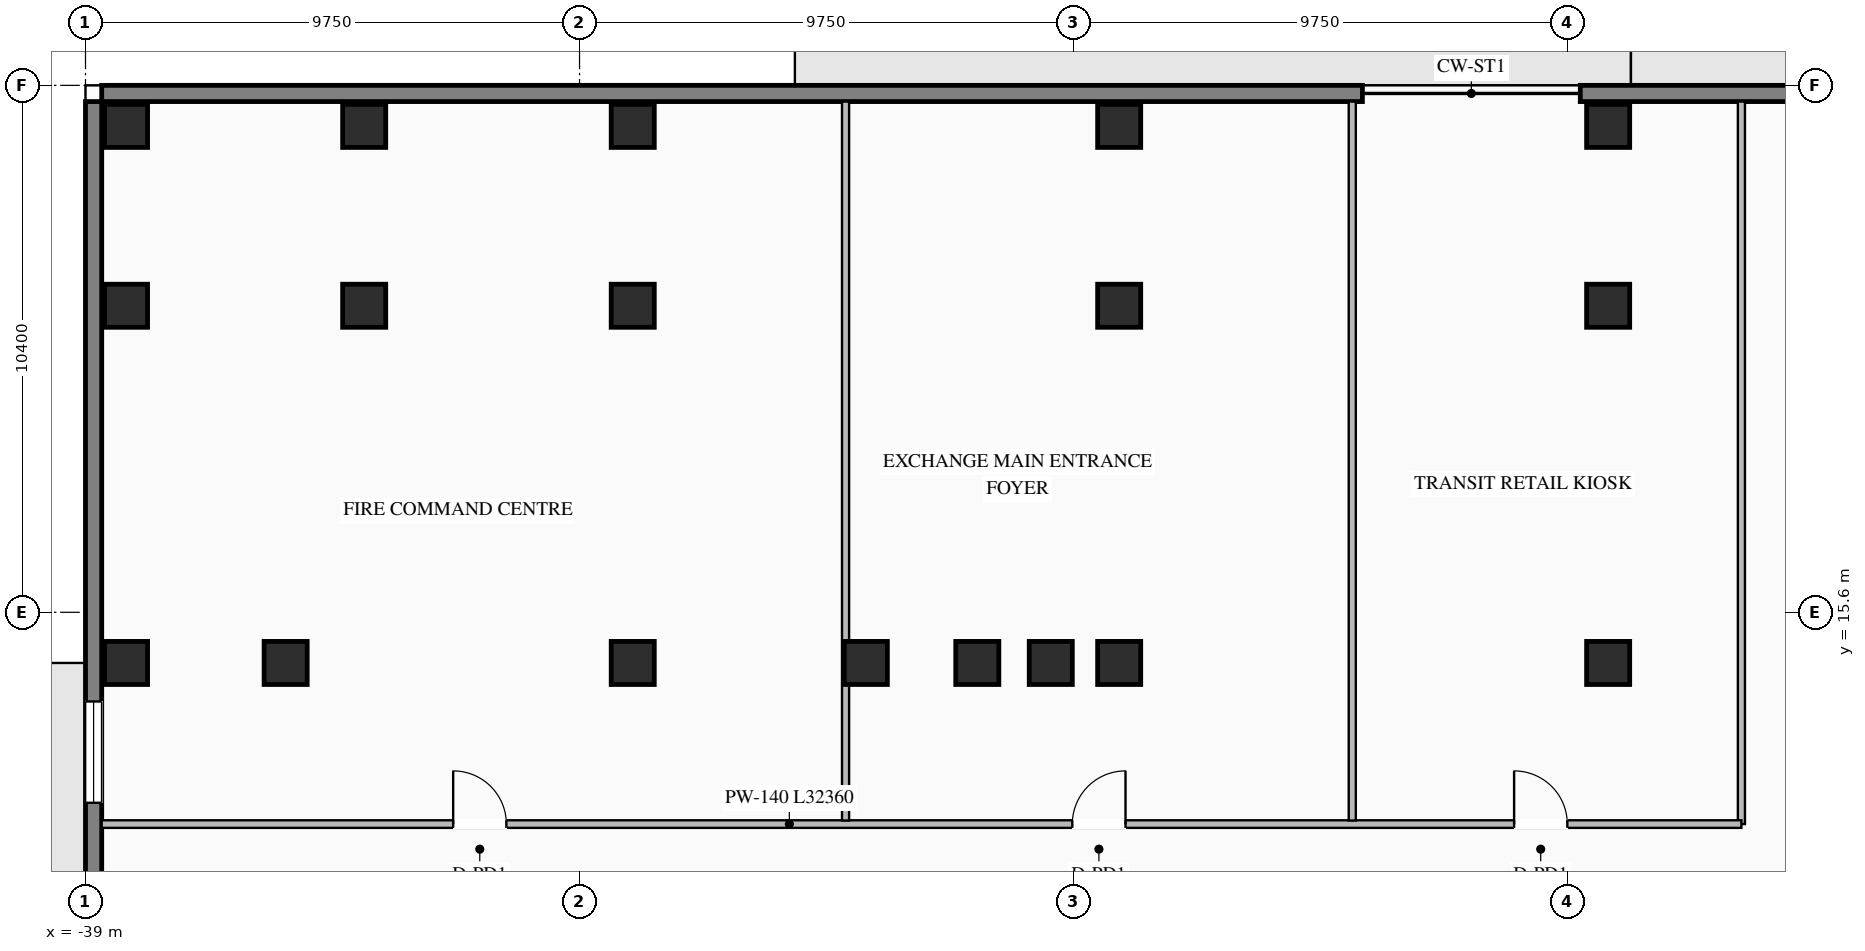
"""IFC4 building model, lengths in metres.
Left out: names, types, materials, properties, quantities, classifications, styles, units other than length and angle.
Written with IfcOpenShell. Run it as: python <this file> out.ifc"""

import sys

from ifc_helpers import new_model, si_unit, direction, frame, frame_2d, origin, origin_2d, place, context, subcontext, project, spatial, rectangle, i_section, extrude, element, fill, save


model = new_model("IFC4")
c1 = context("Model", 3, precision=1e-05, world=origin(), true_north=direction((0.0, 1.0)))
c2 = subcontext(c1, "Body", "Model", "MODEL_VIEW")
j1 = project(units=[si_unit("LENGTHUNIT", "METRE"), si_unit("PLANEANGLEUNIT", "RADIAN")], contexts=[c1])
p1 = place(None, origin())
s1 = spatial("IfcSite", under=j1, at=p1, CompositionType="ELEMENT")
p2 = place(p1, origin())
s2 = spatial("IfcBuilding", under=s1, at=p2, CompositionType="ELEMENT")
p3 = place(p2, origin())
s3 = spatial("IfcBuildingStorey", under=s2, at=p3, CompositionType="ELEMENT", Elevation=0.0)
for number, where, z_axis, x_axis in (
    (1, (-21.4, 14.6, 0.0), (0.0, 0.0, 1.0), (1.0, 0.0, 0.0)),
    (2, (-19.95, 14.6, 0.0), (0.0, 0.0, 1.0), (1.0, 0.0, 0.0)),
    (3, (-18.6, 14.6, 0.0), (0.0, 0.0, 1.0), (1.0, 0.0, 0.0)),
    (4, (-8.95, 14.6, 0.0), (0.0, 0.0, 1.0), (1.0, 0.0, 0.0)),
    (5, (-23.6, 14.6, 0.0), (0.0, 0.0, 1.0), (1.0, 0.0, 0.0)),
    (6, (-28.2, 14.6, 0.0), (0.0, 0.0, 1.0), (1.0, 0.0, 0.0)),
    (7, (-35.05, 14.6, 0.0), (0.0, 0.0, 1.0), (1.0, 0.0, 0.0)),
    (8, (-38.2, 21.65, 0.0), (0.0, 0.0, 1.0), (1.0, 0.0, 0.0)),
    (9, (-33.5, 21.65, 0.0), (0.0, 0.0, 1.0), (1.0, 0.0, 0.0)),
    (10, (-28.2, 21.65, 0.0), (0.0, 0.0, 1.0), (1.0, 0.0, 0.0)),
    (11, (-18.6, 21.65, 0.0), (0.0, 0.0, 1.0), (1.0, 0.0, 0.0)),
    (12, (-8.95, 21.65, 0.0), (0.0, 0.0, 1.0), (1.0, 0.0, 0.0)),
    (13, (-38.2, 25.2, 0.0), (0.0, 0.0, 1.0), (1.0, 0.0, 0.0)),
    (14, (-33.5, 25.2, 0.0), (0.0, 0.0, 1.0), (1.0, 0.0, 0.0)),
    (15, (-28.2, 25.2, 0.0), (0.0, 0.0, 1.0), (1.0, 0.0, 0.0)),
    (16, (-18.6, 25.2, 0.0), (0.0, 0.0, 1.0), (1.0, 0.0, 0.0)),
    (17, (-8.95, 25.2, 0.0), (0.0, 0.0, 1.0), (1.0, 0.0, 0.0)),
    (18, (-38.2, 14.6, 0.0), (0.0, 0.0, 1.0), (1.0, 0.0, 0.0)),
):
    element("IfcColumn", number, at=place(p3, frame(where, z_axis=z_axis, x_axis=x_axis)), inside=s3, PredefinedType="COLUMN", context=c2, shape_type="SweptSolid", body=[
        extrude(i_section(OverallWidth=0.85, OverallDepth=0.85, WebThickness=0.032, FlangeThickness=0.048, at=origin_2d()), origin(), (0.0, 0.0, 1.0), 5.1),
    ])
p4 = place(p3, frame((-38.68, 25.84, 0.0), z_axis=(0.0, 0.0, 1.0), x_axis=(1.0, 0.0, 0.0)))
e19 = element("IfcWall", 19, at=p4, inside=s3, PredefinedType="STANDARD", context=c2, shape_type="SweptSolid", body=[
    extrude(rectangle(XDim=24.88, YDim=0.32, at=frame_2d((12.44, 0.0))), origin(), (0.0, 0.0, 1.0), 4.83),
])
p5 = place(p3, frame((-9.5, 25.84, 0.0), z_axis=(0.0, 0.0, 1.0), x_axis=(1.0, 0.0, 0.0)))
e20 = element("IfcWall", 20, at=p5, inside=s3, PredefinedType="STANDARD", context=c2, shape_type="SweptSolid", body=[
    extrude(rectangle(XDim=19.0, YDim=0.32, at=frame_2d((9.5, 0.0))), origin(), (0.0, 0.0, 1.0), 4.83),
])
p6 = place(p5, frame((5.0, 0.0, 0.0)))
e21 = element("IfcOpeningElement", 21, at=p6, cuts=e20, PredefinedType="OPENING", context=c2, shape_type="SweptSolid", body=[
    extrude(rectangle(XDim=2.4, YDim=2.4, at=frame_2d((1.2, 1.2))), frame((0.0, 0.17, 0.0), z_axis=(0.0, -1.0, 0.0), x_axis=(1.0, 0.0, 0.0)), (0.0, 0.0, 1.0), 0.34),
])
p7 = place(p5, frame((8.5, 0.0, 0.0)))
e22 = element("IfcOpeningElement", 22, at=p7, cuts=e20, PredefinedType="OPENING", context=c2, shape_type="SweptSolid", body=[
    extrude(rectangle(XDim=2.0, YDim=2.3, at=frame_2d((1.0, 1.15))), frame((0.0, 0.17, 0.0), z_axis=(0.0, -1.0, 0.0), x_axis=(1.0, 0.0, 0.0)), (0.0, 0.0, 1.0), 0.34),
])
p8 = place(p5, frame((11.6, 0.0, 0.0)))
e23 = element("IfcOpeningElement", 23, at=p8, cuts=e20, PredefinedType="OPENING", context=c2, shape_type="SweptSolid", body=[
    extrude(rectangle(XDim=2.4, YDim=2.4, at=frame_2d((1.2, 1.2))), frame((0.0, 0.17, 0.0), z_axis=(0.0, -1.0, 0.0), x_axis=(1.0, 0.0, 0.0)), (0.0, 0.0, 1.0), 0.34),
])
p9 = place(p3, frame((-38.84, -25.68, 0.0), z_axis=(0.0, 0.0, 1.0), x_axis=(0.0, 1.0, 0.0)))
e24 = element("IfcWall", 24, at=p9, inside=s3, PredefinedType="STANDARD", context=c2, shape_type="SweptSolid", body=[
    extrude(rectangle(XDim=51.36, YDim=0.32, at=frame_2d((25.68, 0.0))), origin(), (0.0, 0.0, 1.0), 4.83),
])
p10 = place(p9, frame((11.84, 0.0, 0.8)))
e25 = element("IfcOpeningElement", 25, at=p10, cuts=e24, PredefinedType="OPENING", context=c2, shape_type="SweptSolid", body=[
    extrude(rectangle(XDim=2.0, YDim=2.2, at=frame_2d((1.0, 1.1))), frame((0.0, 0.17, 0.0), z_axis=(0.0, -1.0, 0.0), x_axis=(1.0, 0.0, 0.0)), (0.0, 0.0, 1.0), 0.34),
])
p11 = place(p9, frame((24.68, 0.0, 0.8)))
e26 = element("IfcOpeningElement", 26, at=p11, cuts=e24, PredefinedType="OPENING", context=c2, shape_type="SweptSolid", body=[
    extrude(rectangle(XDim=2.0, YDim=2.2, at=frame_2d((1.0, 1.1))), frame((0.0, 0.17, 0.0), z_axis=(0.0, -1.0, 0.0), x_axis=(1.0, 0.0, 0.0)), (0.0, 0.0, 1.0), 0.34),
])
p12 = place(p9, frame((37.52, 0.0, 0.8)))
e27 = element("IfcOpeningElement", 27, at=p12, cuts=e24, PredefinedType="OPENING", context=c2, shape_type="SweptSolid", body=[
    extrude(rectangle(XDim=2.0, YDim=2.2, at=frame_2d((1.0, 1.1))), frame((0.0, 0.17, 0.0), z_axis=(0.0, -1.0, 0.0), x_axis=(1.0, 0.0, 0.0)), (0.0, 0.0, 1.0), 0.34),
])
p13 = place(p3, frame((-6.32, 11.42, 0.0), z_axis=(0.0, 0.0, 1.0), x_axis=(0.0, 1.0, 0.0)))
e28 = element("IfcWall", 28, at=p13, inside=s3, PredefinedType="STANDARD", context=c2, shape_type="SweptSolid", body=[
    extrude(rectangle(XDim=14.26, YDim=0.14, at=frame_2d((7.13, 0.0))), origin(), (0.0, 0.0, 1.0), 4.83),
])
p14 = place(p3, frame((-38.68, 11.42, 0.0), z_axis=(0.0, 0.0, 1.0), x_axis=(1.0, 0.0, 0.0)))
e29 = element("IfcWall", 29, at=p14, inside=s3, PredefinedType="STANDARD", context=c2, shape_type="SweptSolid", body=[
    extrude(rectangle(XDim=32.36, YDim=0.15, at=frame_2d((16.18, 0.0))), origin(), (0.0, 0.0, 1.0), 4.83),
])
p15 = place(p14, frame((6.936, 0.0, 0.0)))
e30 = element("IfcOpeningElement", 30, at=p15, cuts=e29, PredefinedType="OPENING", context=c2, shape_type="SweptSolid", body=[
    extrude(rectangle(XDim=1.05, YDim=2.08, at=frame_2d((0.525, 1.04))), frame((0.0, 0.085, 0.0), z_axis=(0.0, -1.0, 0.0), x_axis=(1.0, 0.0, 0.0)), (0.0, 0.0, 1.0), 0.17),
])
p16 = place(p14, frame((19.155, 0.0, 0.0)))
e31 = element("IfcOpeningElement", 31, at=p16, cuts=e29, PredefinedType="OPENING", context=c2, shape_type="SweptSolid", body=[
    extrude(rectangle(XDim=1.05, YDim=2.08, at=frame_2d((0.525, 1.04))), frame((0.0, 0.085, 0.0), z_axis=(0.0, -1.0, 0.0), x_axis=(1.0, 0.0, 0.0)), (0.0, 0.0, 1.0), 0.17),
])
p17 = place(p14, frame((27.874, 0.0, 0.0)))
e32 = element("IfcOpeningElement", 32, at=p17, cuts=e29, PredefinedType="OPENING", context=c2, shape_type="SweptSolid", body=[
    extrude(rectangle(XDim=1.05, YDim=2.08, at=frame_2d((0.525, 1.04))), frame((0.0, 0.085, 0.0), z_axis=(0.0, -1.0, 0.0), x_axis=(1.0, 0.0, 0.0)), (0.0, 0.0, 1.0), 0.17),
])
for number, where, z_axis, x_axis in (
    (33, (-24.0, 11.49, 0.0), (0.0, 0.0, 1.0), (0.0, 1.0, 0.0)),
    (34, (-14.0, 11.49, 0.0), (0.0, 0.0, 1.0), (0.0, 1.0, 0.0)),
):
    element("IfcWall", number, at=place(p3, frame(where, z_axis=z_axis, x_axis=x_axis)), inside=s3, PredefinedType="STANDARD", context=c2, shape_type="SweptSolid", body=[
        extrude(rectangle(XDim=14.19, YDim=0.14, at=frame_2d((7.095, 0.0))), origin(), (0.0, 0.0, 1.0), 4.83),
    ])
p18 = place(p12, origin())
e35 = element("IfcWindow", 35, at=p18, inside=s3, PartitioningType="DOUBLE_PANEL_VERTICAL", PredefinedType="WINDOW", context=c2, shape_type="SweptSolid", body=[
    extrude(rectangle(XDim=2.0, YDim=2.2, at=frame_2d((1.0, 1.1))), frame((0.0, 0.03, 0.0), z_axis=(0.0, -1.0, 0.0), x_axis=(1.0, 0.0, 0.0)), (0.0, 0.0, 1.0), 0.06),
])
fill(e27, e35)
p19 = place(p15, origin())
e36 = element("IfcDoor", 36, at=p19, inside=s3, OperationType="SINGLE_SWING_LEFT", PredefinedType="DOOR", context=c2, shape_type="SweptSolid", body=[
    extrude(rectangle(XDim=1.05, YDim=2.08, at=frame_2d((0.525, 1.04))), frame((0.0, 0.025, 0.0), z_axis=(0.0, -1.0, 0.0), x_axis=(1.0, 0.0, 0.0)), (0.0, 0.0, 1.0), 0.05),
])
fill(e30, e36)
p20 = place(p16, origin())
e37 = element("IfcDoor", 37, at=p20, inside=s3, OperationType="SINGLE_SWING_RIGHT", PredefinedType="DOOR", context=c2, shape_type="SweptSolid", body=[
    extrude(rectangle(XDim=1.05, YDim=2.08, at=frame_2d((0.525, 1.04))), frame((0.0, 0.025, 0.0), z_axis=(0.0, -1.0, 0.0), x_axis=(1.0, 0.0, 0.0)), (0.0, 0.0, 1.0), 0.05),
])
fill(e31, e37)
p21 = place(p17, origin())
e38 = element("IfcDoor", 38, at=p21, inside=s3, OperationType="SINGLE_SWING_LEFT", PredefinedType="DOOR", context=c2, shape_type="SweptSolid", body=[
    extrude(rectangle(XDim=1.05, YDim=2.08, at=frame_2d((0.525, 1.04))), frame((0.0, 0.025, 0.0), z_axis=(0.0, -1.0, 0.0), x_axis=(1.0, 0.0, 0.0)), (0.0, 0.0, 1.0), 0.05),
])
fill(e32, e38)
save(model, sys.argv[1])
